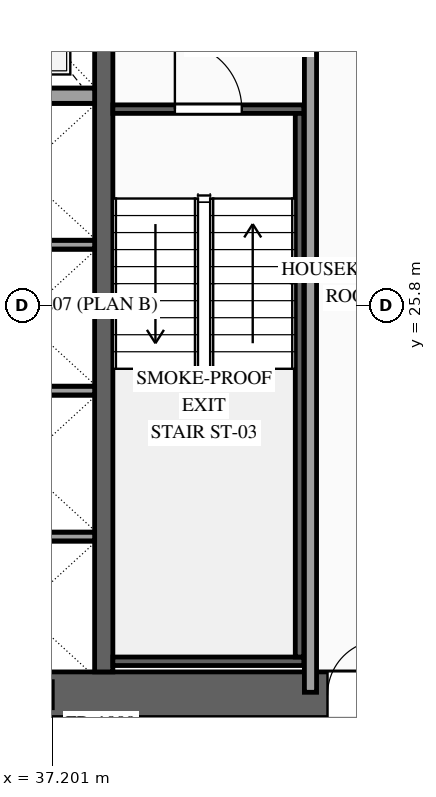
"""IFC4 building model, lengths in metres.
Left out: names, types, materials, properties, quantities, classifications, styles, units other than length and angle.
Written with IfcOpenShell. Run it as: python <this file> out.ifc"""

import sys

from ifc_helpers import new_model, si_unit, direction, frame, frame_2d, origin, origin_2d, place, context, subcontext, project, spatial, rectangle, i_section, extrude, source, transform, mapped, element, fill, save


model = new_model("IFC4")
c1 = context("Model", 3, precision=1e-05, world=origin(), true_north=direction((0.0, 1.0)))
c2 = subcontext(c1, "Body", "Model", "MODEL_VIEW")
j1 = project(units=[si_unit("LENGTHUNIT", "METRE"), si_unit("PLANEANGLEUNIT", "RADIAN")], contexts=[c1])
p1 = place(None, origin())
s1 = spatial("IfcSite", under=j1, at=p1, CompositionType="ELEMENT")
p2 = place(p1, origin())
s2 = spatial("IfcBuilding", under=s1, at=p2, CompositionType="ELEMENT")
p3 = place(p2, frame((0.0, 0.0, 101.0)))
s3 = spatial("IfcBuildingStorey", under=s2, at=p3, CompositionType="ELEMENT", Elevation=101.0)
p4 = place(p3, frame((23.425, 19.4, 0.0), z_axis=(0.0, 0.0, 1.0), x_axis=(1.0, 0.0, 0.0)))
e1 = element("IfcWall", 1, at=p4, inside=s3, PredefinedType="SHEAR", context=c2, shape_type="SweptSolid", body=[
    extrude(rectangle(XDim=27.15, YDim=0.75, at=frame_2d((13.575, 0.0))), origin(), (0.0, 0.0, 1.0), 3.6),
])
p5 = place(p4, frame((2.025, 0.0, 0.0)))
e2 = element("IfcOpeningElement", 2, at=p5, cuts=e1, PredefinedType="OPENING", context=c2, shape_type="SweptSolid", body=[
    extrude(rectangle(XDim=1.1, YDim=2.2, at=frame_2d((0.55, 1.1))), frame((0.0, 0.39, 0.0), z_axis=(0.0, -1.0, 0.0), x_axis=(1.0, 0.0, 0.0)), (0.0, 0.0, 1.0), 0.78),
])
p6 = place(p4, frame((9.925, 0.0, 0.0)))
e3 = element("IfcOpeningElement", 3, at=p6, cuts=e1, PredefinedType="OPENING", context=c2, shape_type="SweptSolid", body=[
    extrude(rectangle(XDim=1.1, YDim=2.2, at=frame_2d((0.55, 1.1))), frame((0.0, 0.39, 0.0), z_axis=(0.0, -1.0, 0.0), x_axis=(1.0, 0.0, 0.0)), (0.0, 0.0, 1.0), 0.78),
])
p7 = place(p4, frame((23.125, 0.0, 0.0)))
e4 = element("IfcOpeningElement", 4, at=p7, cuts=e1, PredefinedType="OPENING", context=c2, shape_type="SweptSolid", body=[
    extrude(rectangle(XDim=1.1, YDim=2.2, at=frame_2d((0.55, 1.1))), frame((0.0, 0.39, 0.0), z_axis=(0.0, -1.0, 0.0), x_axis=(1.0, 0.0, 0.0)), (0.0, 0.0, 1.0), 0.78),
])
p8 = place(p4, frame((19.745, 0.0, 0.0)))
e5 = element("IfcOpeningElement", 5, at=p8, cuts=e1, PredefinedType="OPENING", context=c2, shape_type="SweptSolid", body=[
    extrude(rectangle(XDim=0.9, YDim=2.15, at=frame_2d((0.45, 1.075))), frame((0.0, 0.39, 0.0), z_axis=(0.0, -1.0, 0.0), x_axis=(1.0, 0.0, 0.0)), (0.0, 0.0, 1.0), 0.78),
])
p9 = place(p4, frame((18.305, 0.0, 0.0)))
e6 = element("IfcOpeningElement", 6, at=p9, cuts=e1, PredefinedType="OPENING", context=c2, shape_type="SweptSolid", body=[
    extrude(rectangle(XDim=0.9, YDim=2.15, at=frame_2d((0.45, 1.075))), frame((0.0, 0.39, 0.0), z_axis=(0.0, -1.0, 0.0), x_axis=(1.0, 0.0, 0.0)), (0.0, 0.0, 1.0), 0.78),
])
m1 = source(origin(), c2, "Body", "SweptSolid", [
    extrude(rectangle(XDim=12.05, YDim=0.3, at=frame_2d((6.025, 0.0))), origin(), (0.0, 0.0, 1.0), 3.6),
])
p10 = place(p3, frame((38.05, 19.775, 0.0), z_axis=(0.0, 0.0, 1.0), x_axis=(0.0, 1.0, 0.0)))
e7 = element("IfcWall", 7, at=p10, inside=s3, PredefinedType="SOLIDWALL", context=c2, shape_type="MappedRepresentation", body=[
    mapped(m1, transform((0.0, 0.0, 0.0), scale=1.0)),
])
m2 = source(origin(), c2, "Body", "SweptSolid", [
    extrude(i_section(OverallWidth=0.407, OverallDepth=0.428, WebThickness=0.02, FlangeThickness=0.035, at=origin_2d()), origin(), (0.0, 0.0, 1.0), 3.6),
])
p11 = place(p3, frame((37.0, 19.4, 0.0), z_axis=(0.0, 0.0, 1.0), x_axis=(1.0, 0.0, 0.0)))
e8 = element("IfcColumn", 8, at=p11, inside=s3, PredefinedType="COLUMN", context=c2, shape_type="MappedRepresentation", body=[
    mapped(m2, transform((0.0, 0.0, 0.0), scale=1.0)),
])
m3 = source(origin(), c2, "Body", "SweptSolid", [
    extrude(rectangle(XDim=2.4, YDim=0.14, at=frame_2d((1.2, 0.0))), origin(), (0.0, 0.0, 1.0), 3.38),
])
for number, where, z_axis, x_axis in (
    (9, (35.5, 22.0, 0.0), (0.0, 0.0, 1.0), (1.0, 0.0, 0.0)),
    (10, (35.5, 24.4, 0.0), (0.0, 0.0, 1.0), (1.0, 0.0, 0.0)),
    (11, (35.5, 26.8, 0.0), (0.0, 0.0, 1.0), (1.0, 0.0, 0.0)),
):
    element("IfcWall", number, at=place(p3, frame(where, z_axis=z_axis, x_axis=x_axis)), inside=s3, PredefinedType="SOLIDWALL", context=c2, shape_type="MappedRepresentation", body=[
        mapped(m3, transform((0.0, 0.0, 0.0), scale=1.0)),
    ])
m4 = source(origin(), c2, "Body", "SweptSolid", [
    extrude(rectangle(XDim=2.4, YDim=0.25, at=frame_2d((1.2, 0.0))), origin(), (0.0, 0.0, 1.0), 3.38),
])
p12 = place(p3, frame((35.5, 29.25, 0.0), z_axis=(0.0, 0.0, 1.0), x_axis=(1.0, 0.0, 0.0)))
e12 = element("IfcWall", 12, at=p12, inside=s3, PredefinedType="SOLIDWALL", context=c2, shape_type="MappedRepresentation", body=[
    mapped(m4, transform((0.0, 0.0, 0.0), scale=1.0)),
])
p13 = place(p3, frame((38.2, 29.03, 0.0), z_axis=(0.0, 0.0, 1.0), x_axis=(1.0, 0.0, 0.0)))
e13 = element("IfcWall", 13, at=p13, inside=s3, PredefinedType="SOLIDWALL", context=c2, shape_type="SweptSolid", body=[
    extrude(rectangle(XDim=3.14, YDim=0.14, at=frame_2d((1.57, 0.0))), origin(), (0.0, 0.0, 1.0), 3.38),
])
p14 = place(p13, frame((1.02, 0.0, 0.0)))
e14 = element("IfcOpeningElement", 14, at=p14, cuts=e13, PredefinedType="OPENING", context=c2, shape_type="SweptSolid", body=[
    extrude(rectangle(XDim=1.1, YDim=2.2, at=frame_2d((0.55, 1.1))), frame((0.0, 0.085, 0.0), z_axis=(0.0, -1.0, 0.0), x_axis=(1.0, 0.0, 0.0)), (0.0, 0.0, 1.0), 0.17),
])
m5 = source(origin(), c2, "Body", "SweptSolid", [
    extrude(rectangle(XDim=3.14, YDim=0.14, at=frame_2d((1.57, 0.0))), origin(), (0.0, 0.0, 1.0), 3.38),
])
p15 = place(p3, frame((38.2, 19.95, 0.0), z_axis=(0.0, 0.0, 1.0), x_axis=(1.0, 0.0, 0.0)))
e15 = element("IfcWall", 15, at=p15, inside=s3, PredefinedType="SOLIDWALL", context=c2, shape_type="MappedRepresentation", body=[
    mapped(m5, transform((0.0, 0.0, 0.0), scale=1.0)),
])
m6 = source(origin(), c2, "Body", "SweptSolid", [
    extrude(rectangle(XDim=8.94, YDim=0.14, at=frame_2d((4.47, 0.0))), origin(), (0.0, 0.0, 1.0), 3.38),
])
p16 = place(p3, frame((41.27, 20.02, 0.0), z_axis=(0.0, 0.0, 1.0), x_axis=(0.0, 1.0, 0.0)))
e16 = element("IfcWall", 16, at=p16, inside=s3, PredefinedType="SOLIDWALL", context=c2, shape_type="MappedRepresentation", body=[
    mapped(m6, transform((0.0, 0.0, 0.0), scale=1.0)),
])
m7 = source(origin(), c2, "Body", "SweptSolid", [
    extrude(rectangle(XDim=12.72, YDim=0.2, at=frame_2d((6.36, 0.0))), origin(), (0.0, 0.0, 1.0), 3.38),
])
p17 = place(p3, frame((41.45, 19.44, 0.0), z_axis=(0.0, 0.0, 1.0), x_axis=(0.0, 1.0, 0.0)))
e17 = element("IfcWall", 17, at=p17, inside=s3, PredefinedType="PARTITIONING", context=c2, shape_type="MappedRepresentation", body=[
    mapped(m7, transform((0.0, 0.0, 0.0), scale=1.0)),
])
m8 = source(origin(), c2, "Body", "SweptSolid", [
    extrude(rectangle(XDim=1.1, YDim=2.2, at=frame_2d((0.55, 1.1))), frame((0.0, 0.025, 0.0), z_axis=(0.0, -1.0, 0.0), x_axis=(1.0, 0.0, 0.0)), (0.0, 0.0, 1.0), 0.05),
])
p18 = place(p14, origin())
e18 = element("IfcDoor", 18, at=p18, inside=s3, OperationType="SINGLE_SWING_LEFT", PredefinedType="DOOR", context=c2, shape_type="MappedRepresentation", body=[
    mapped(m8, transform((0.0, 0.0, 0.0), scale=1.0)),
])
fill(e14, e18)
m9 = source(origin(), c2, "Body", "SweptSolid", [
    extrude(rectangle(XDim=0.9, YDim=2.15, at=frame_2d((0.45, 1.075))), frame((0.0, 0.025, 0.0), z_axis=(0.0, -1.0, 0.0), x_axis=(1.0, 0.0, 0.0)), (0.0, 0.0, 1.0), 0.05),
])
p19 = place(p9, origin())
e19 = element("IfcDoor", 19, at=p19, inside=s3, OperationType="SINGLE_SWING_RIGHT", PredefinedType="DOOR", context=c2, shape_type="MappedRepresentation", body=[
    mapped(m9, transform((0.0, 0.0, 0.0), scale=1.0)),
])
fill(e6, e19)
save(model, sys.argv[1])
